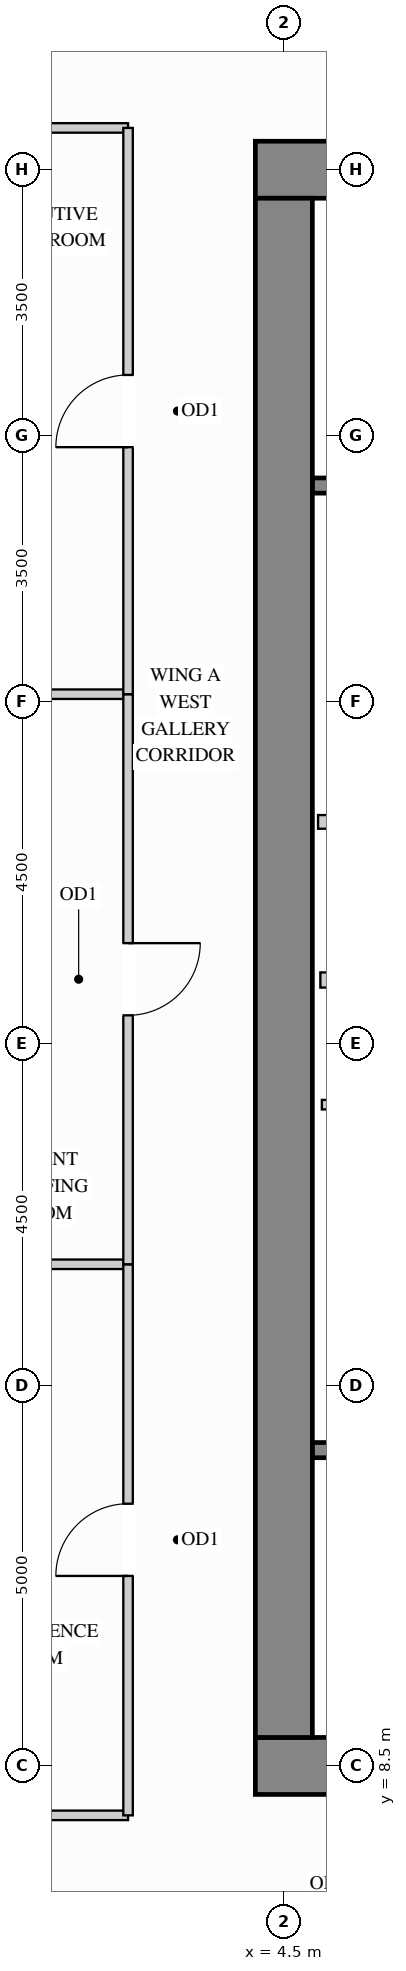
"""IFC4 building model, lengths in metres.
Left out: names, types, materials, properties, quantities, classifications, styles, units other than length and angle.
Written with IfcOpenShell. Run it as: python <this file> out.ifc"""

import sys

from ifc_helpers import new_model, si_unit, direction, frame, frame_2d, origin, place, context, subcontext, project, spatial, rectangle, extrude, source, transform, mapped, element, fill, save


model = new_model("IFC4")
c1 = context("Model", 3, precision=1e-05, world=origin(), true_north=direction((0.0, 1.0)))
c2 = subcontext(c1, "Body", "Model", "MODEL_VIEW")
j1 = project(units=[si_unit("LENGTHUNIT", "METRE"), si_unit("PLANEANGLEUNIT", "RADIAN")], contexts=[c1])
p1 = place(None, origin())
s1 = spatial("IfcSite", under=j1, at=p1, CompositionType="ELEMENT")
p2 = place(p1, origin())
s2 = spatial("IfcBuilding", under=s1, at=p2, CompositionType="ELEMENT")
p3 = place(p2, frame((0.0, 0.0, 106.2)))
s3 = spatial("IfcBuildingStorey", under=s2, at=p3, CompositionType="ELEMENT", Elevation=106.2)
m1 = source(origin(), c2, "Body", "SweptSolid", [
    extrude(rectangle(XDim=10.75, YDim=0.75, at=frame_2d((5.375, 0.0))), origin(), (0.0, 0.0, 1.0), 3.38),
])
for number, where, z_axis, x_axis in (
    (1, (4.125, 29.5, 0.0), (0.0, 0.0, 1.0), (1.0, 0.0, 0.0)),
    (2, (4.125, 8.5, 0.0), (0.0, 0.0, 1.0), (1.0, 0.0, 0.0)),
):
    element("IfcWall", number, at=place(p3, frame(where, z_axis=z_axis, x_axis=x_axis)), inside=s3, PredefinedType="SHEAR", context=c2, shape_type="MappedRepresentation", body=[
        mapped(m1, transform((0.0, 0.0, 0.0), x_axis=(1.0, 0.0, 0.0), y_axis=(0.0, 1.0, 0.0), z_axis=(0.0, 0.0, 1.0))),
    ])
m2 = source(origin(), c2, "Body", "SweptSolid", [
    extrude(rectangle(XDim=20.25, YDim=0.75, at=frame_2d((10.125, 0.0))), origin(), (0.0, 0.0, 1.0), 3.38),
])
p4 = place(p3, frame((4.5, 8.875, 0.0), z_axis=(0.0, 0.0, 1.0), x_axis=(0.0, 1.0, 0.0)))
e3 = element("IfcWall", 3, at=p4, inside=s3, PredefinedType="SHEAR", context=c2, shape_type="MappedRepresentation", body=[
    mapped(m2, transform((0.0, 0.0, 0.0), x_axis=(1.0, 0.0, 0.0), y_axis=(0.0, 1.0, 0.0), z_axis=(0.0, 0.0, 1.0))),
])
m3 = source(origin(), c2, "Body", "SweptSolid", [
    extrude(rectangle(XDim=2.2, YDim=0.18, at=frame_2d((1.1, 0.0))), origin(), (0.0, 0.0, 1.0), 3.365),
])
p5 = place(p3, frame((4.95, 20.92, 0.0), z_axis=(0.0, 0.0, 1.0), x_axis=(1.0, 0.0, 0.0)))
e4 = element("IfcWall", 4, at=p5, inside=s3, PredefinedType="PARTITIONING", context=c2, shape_type="MappedRepresentation", body=[
    mapped(m3, transform((0.0, 0.0, 0.0), x_axis=(1.0, 0.0, 0.0), y_axis=(0.0, 1.0, 0.0), z_axis=(0.0, 0.0, 1.0))),
])
p6 = place(p3, frame((5.0, 17.2, 0.0), z_axis=(0.0, 0.0, 1.0), x_axis=(1.0, 0.0, 0.0)))
e5 = element("IfcWall", 5, at=p6, inside=s3, PredefinedType="PARTITIONING", context=c2, shape_type="SweptSolid", body=[
    extrude(rectangle(XDim=2.4, YDim=0.125, at=frame_2d((1.2, 0.0))), origin(), (0.0, 0.0, 1.0), 3.365),
])
p7 = place(p6, frame((0.7, 0.0, 0.0)))
e6 = element("IfcOpeningElement", 6, at=p7, cuts=e5, PredefinedType="OPENING", context=c2, shape_type="SweptSolid", body=[
    extrude(rectangle(XDim=0.85, YDim=2.1, at=frame_2d((0.425, 1.05))), frame((0.0, 0.073, 0.0), z_axis=(0.0, -1.0, 0.0), x_axis=(1.0, 0.0, 0.0)), (0.0, 0.0, 1.0), 0.145),
])
m4 = source(origin(), c2, "Body", "SweptSolid", [
    extrude(rectangle(XDim=1.26, YDim=0.125, at=frame_2d((0.63, 0.0))), origin(), (0.0, 0.0, 1.0), 3.365),
])
p8 = place(p3, frame((1.19, 30.05, 0.0), z_axis=(0.0, 0.0, 1.0), x_axis=(1.0, 0.0, 0.0)))
e7 = element("IfcWall", 7, at=p8, inside=s3, PredefinedType="PARTITIONING", context=c2, shape_type="MappedRepresentation", body=[
    mapped(m4, transform((0.0, 0.0, 0.0), x_axis=(1.0, 0.0, 0.0), y_axis=(0.0, 1.0, 0.0), z_axis=(0.0, 0.0, 1.0))),
])
m5 = source(origin(), c2, "Body", "SweptSolid", [
    extrude(rectangle(XDim=2.098, YDim=0.125, at=frame_2d((1.049, 0.0))), origin(), (0.0, 0.0, 1.0), 3.365),
])
for number, where, z_axis, x_axis in (
    (8, (0.352, 7.85, 0.0), (0.0, 0.0, 1.0), (1.0, 0.0, 0.0)),
    (9, (0.352, 15.1, 0.0), (0.0, 0.0, 1.0), (1.0, 0.0, 0.0)),
):
    element("IfcWall", number, at=place(p3, frame(where, z_axis=z_axis, x_axis=x_axis)), inside=s3, PredefinedType="PARTITIONING", context=c2, shape_type="MappedRepresentation", body=[
        mapped(m5, transform((0.0, 0.0, 0.0), x_axis=(1.0, 0.0, 0.0), y_axis=(0.0, 1.0, 0.0), z_axis=(0.0, 0.0, 1.0))),
    ])
p9 = place(p3, frame((1.19, 22.6, 0.0), z_axis=(0.0, 0.0, 1.0), x_axis=(1.0, 0.0, 0.0)))
e10 = element("IfcWall", 10, at=p9, inside=s3, PredefinedType="PARTITIONING", context=c2, shape_type="MappedRepresentation", body=[
    mapped(m4, transform((0.0, 0.0, 0.0), x_axis=(1.0, 0.0, 0.0), y_axis=(0.0, 1.0, 0.0), z_axis=(0.0, 0.0, 1.0))),
])
p10 = place(p3, frame((2.45, 7.85, 0.0), z_axis=(0.0, 0.0, 1.0), x_axis=(0.0, 1.0, 0.0)))
e11 = element("IfcWall", 11, at=p10, inside=s3, PredefinedType="PARTITIONING", context=c2, shape_type="SweptSolid", body=[
    extrude(rectangle(XDim=7.25, YDim=0.125, at=frame_2d((3.625, 0.0))), origin(), (0.0, 0.0, 1.0), 3.365),
])
p11 = place(p10, frame((3.15, 0.0, 0.0)))
e12 = element("IfcOpeningElement", 12, at=p11, cuts=e11, PredefinedType="OPENING", context=c2, shape_type="SweptSolid", body=[
    extrude(rectangle(XDim=0.95, YDim=2.15, at=frame_2d((0.475, 1.075))), frame((0.0, 0.073, 0.0), z_axis=(0.0, -1.0, 0.0), x_axis=(1.0, 0.0, 0.0)), (0.0, 0.0, 1.0), 0.145),
])
p12 = place(p3, frame((2.45, 15.1, 0.0), z_axis=(0.0, 0.0, 1.0), x_axis=(0.0, 1.0, 0.0)))
e13 = element("IfcWall", 13, at=p12, inside=s3, PredefinedType="PARTITIONING", context=c2, shape_type="SweptSolid", body=[
    extrude(rectangle(XDim=7.5, YDim=0.125, at=frame_2d((3.75, 0.0))), origin(), (0.0, 0.0, 1.0), 3.365),
])
p13 = place(p12, frame((3.275, 0.0, 0.0)))
e14 = element("IfcOpeningElement", 14, at=p13, cuts=e13, PredefinedType="OPENING", context=c2, shape_type="SweptSolid", body=[
    extrude(rectangle(XDim=0.95, YDim=2.15, at=frame_2d((0.475, 1.075))), frame((0.0, 0.073, 0.0), z_axis=(0.0, -1.0, 0.0), x_axis=(1.0, 0.0, 0.0)), (0.0, 0.0, 1.0), 0.145),
])
p14 = place(p3, frame((2.45, 22.6, 0.0), z_axis=(0.0, 0.0, 1.0), x_axis=(0.0, 1.0, 0.0)))
e15 = element("IfcWall", 15, at=p14, inside=s3, PredefinedType="PARTITIONING", context=c2, shape_type="SweptSolid", body=[
    extrude(rectangle(XDim=7.45, YDim=0.125, at=frame_2d((3.725, 0.0))), origin(), (0.0, 0.0, 1.0), 3.365),
])
p15 = place(p14, frame((3.25, 0.0, 0.0)))
e16 = element("IfcOpeningElement", 16, at=p15, cuts=e15, PredefinedType="OPENING", context=c2, shape_type="SweptSolid", body=[
    extrude(rectangle(XDim=0.95, YDim=2.15, at=frame_2d((0.475, 1.075))), frame((0.0, 0.073, 0.0), z_axis=(0.0, -1.0, 0.0), x_axis=(1.0, 0.0, 0.0)), (0.0, 0.0, 1.0), 0.145),
])
m6 = source(origin(), c2, "Body", "SweptSolid", [
    extrude(rectangle(XDim=2.09, YDim=0.2, at=frame_2d((1.045, 0.0))), origin(), (0.0, 0.0, 1.0), 3.365),
])
p16 = place(p3, frame((4.98, 18.84, 0.0), z_axis=(0.0, 0.0, 1.0), x_axis=(1.0, 0.0, 0.0)))
e17 = element("IfcWall", 17, at=p16, inside=s3, PredefinedType="PARTITIONING", context=c2, shape_type="MappedRepresentation", body=[
    mapped(m6, transform((0.0, 0.0, 0.0), x_axis=(1.0, 0.0, 0.0), y_axis=(0.0, 1.0, 0.0), z_axis=(0.0, 0.0, 1.0))),
])
p17 = place(p3, frame((4.877, 12.655, 0.0), z_axis=(0.0, 0.0, 1.0), x_axis=(1.0, 0.0, 0.0)))
e18 = element("IfcWall", 18, at=p17, inside=s3, PredefinedType="SHEAR", context=c2, shape_type="SweptSolid", body=[
    extrude(rectangle(XDim=7.528, YDim=0.2, at=frame_2d((3.764, 0.0))), origin(), (0.0, 0.0, 1.0), 3.38),
])
p18 = place(p17, frame((0.4, 0.0, 0.0)))
e19 = element("IfcOpeningElement", 19, at=p18, cuts=e18, PredefinedType="OPENING", context=c2, shape_type="SweptSolid", body=[
    extrude(rectangle(XDim=1.1, YDim=2.15, at=frame_2d((0.55, 1.075))), frame((0.0, 0.11, 0.0), z_axis=(0.0, -1.0, 0.0), x_axis=(1.0, 0.0, 0.0)), (0.0, 0.0, 1.0), 0.22),
])
p19 = place(p3, frame((4.877, 25.345, 0.0), z_axis=(0.0, 0.0, 1.0), x_axis=(1.0, 0.0, 0.0)))
e20 = element("IfcWall", 20, at=p19, inside=s3, PredefinedType="SHEAR", context=c2, shape_type="SweptSolid", body=[
    extrude(rectangle(XDim=7.528, YDim=0.2, at=frame_2d((3.764, 0.0))), origin(), (0.0, 0.0, 1.0), 3.38),
])
p20 = place(p19, frame((0.4, 0.0, 0.0)))
e21 = element("IfcOpeningElement", 21, at=p20, cuts=e20, PredefinedType="OPENING", context=c2, shape_type="SweptSolid", body=[
    extrude(rectangle(XDim=1.1, YDim=2.15, at=frame_2d((0.55, 1.075))), frame((0.0, 0.11, 0.0), z_axis=(0.0, -1.0, 0.0), x_axis=(1.0, 0.0, 0.0)), (0.0, 0.0, 1.0), 0.22),
])
m7 = source(origin(), c2, "Body", "SweptSolid", [
    extrude(rectangle(XDim=0.95, YDim=2.15, at=frame_2d((0.475, 1.075))), frame((0.0, 0.025, 0.0), z_axis=(0.0, -1.0, 0.0), x_axis=(1.0, 0.0, 0.0)), (0.0, 0.0, 1.0), 0.05),
])
p21 = place(p11, origin())
e22 = element("IfcDoor", 22, at=p21, inside=s3, OperationType="SINGLE_SWING_LEFT", PredefinedType="DOOR", context=c2, shape_type="MappedRepresentation", body=[
    mapped(m7, transform((0.0, 0.0, 0.0), x_axis=(1.0, 0.0, 0.0), y_axis=(0.0, 1.0, 0.0), z_axis=(0.0, 0.0, 1.0))),
])
fill(e12, e22)
p22 = place(p13, origin())
e23 = element("IfcDoor", 23, at=p22, inside=s3, OperationType="SINGLE_SWING_RIGHT", PredefinedType="DOOR", context=c2, shape_type="MappedRepresentation", body=[
    mapped(m7, transform((0.0, 0.0, 0.0), x_axis=(1.0, 0.0, 0.0), y_axis=(0.0, 1.0, 0.0), z_axis=(0.0, 0.0, 1.0))),
])
fill(e14, e23)
p23 = place(p15, origin())
e24 = element("IfcDoor", 24, at=p23, inside=s3, OperationType="SINGLE_SWING_LEFT", PredefinedType="DOOR", context=c2, shape_type="MappedRepresentation", body=[
    mapped(m7, transform((0.0, 0.0, 0.0), x_axis=(1.0, 0.0, 0.0), y_axis=(0.0, 1.0, 0.0), z_axis=(0.0, 0.0, 1.0))),
])
fill(e16, e24)
save(model, sys.argv[1])
